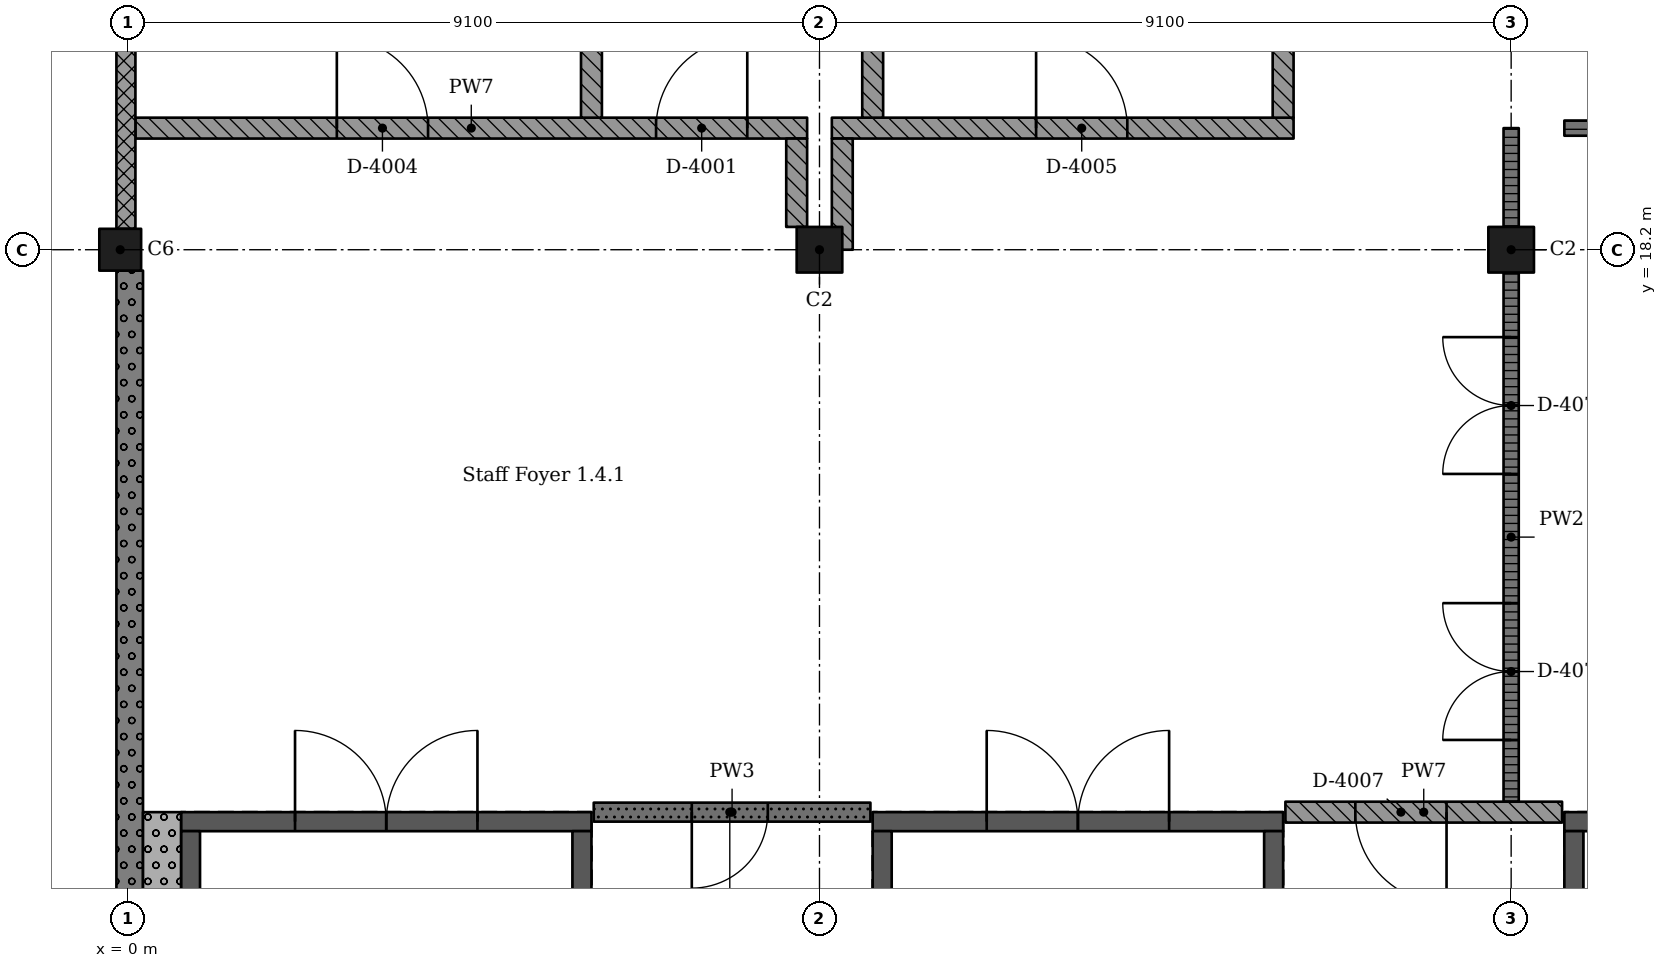
"""IFC4 building model, lengths in metres.
Left out: names, types, materials, properties, quantities, classifications, styles, units other than length and angle.
Written with IfcOpenShell. Run it as: python <this file> out.ifc"""

import sys

from ifc_helpers import new_model, si_unit, direction, frame, frame_2d, origin, origin_2d, place, context, subcontext, project, spatial, rectangle, extrude, element, fill, save


model = new_model("IFC4")
c1 = context("Model", 3, precision=1e-05, world=origin(), true_north=direction((0.0, 1.0)))
c2 = subcontext(c1, "Body", "Model", "MODEL_VIEW")
j1 = project(units=[si_unit("LENGTHUNIT", "METRE"), si_unit("PLANEANGLEUNIT", "RADIAN")], contexts=[c1])
p1 = place(None, origin())
s1 = spatial("IfcSite", under=j1, at=p1, CompositionType="ELEMENT")
p2 = place(p1, origin())
s2 = spatial("IfcBuilding", under=s1, at=p2, CompositionType="ELEMENT")
p3 = place(p2, frame((0.0, 0.0, 20.02)))
s3 = spatial("IfcBuildingStorey", under=s2, at=p3, CompositionType="ELEMENT", Elevation=20.02)
p4 = place(p3, frame((-0.1, 18.2, 0.0), z_axis=(0.0, 0.0, 1.0), x_axis=(1.0, 0.0, 0.0)))
e1 = element("IfcColumn", 1, at=p4, inside=s3, PredefinedType="COLUMN", context=c2, shape_type="SweptSolid", body=[
    extrude(rectangle(XDim=0.55, YDim=0.55, at=origin_2d()), origin(), (0.0, 0.0, 1.0), 4.55),
])
for number, where, z_axis, x_axis in (
    (2, (9.1, 18.2, 0.0), (0.0, 0.0, 1.0), (1.0, 0.0, 0.0)),
    (3, (18.2, 18.2, 0.0), (0.0, 0.0, 1.0), (1.0, 0.0, 0.0)),
):
    element("IfcColumn", number, at=place(p3, frame(where, z_axis=z_axis, x_axis=x_axis)), inside=s3, PredefinedType="COLUMN", context=c2, shape_type="SweptSolid", body=[
        extrude(rectangle(XDim=0.6, YDim=0.6, at=origin_2d()), origin(), (0.0, 0.0, 1.0), 4.55),
    ])
p5 = place(p3, frame((6.1, 10.675, 0.0), z_axis=(0.0, 0.0, 1.0), x_axis=(-1.0, 0.0, 0.0)))
e4 = element("IfcWall", 4, at=p5, inside=s3, PredefinedType="SHEAR", context=c2, shape_type="SweptSolid", body=[
    extrude(rectangle(XDim=5.4, YDim=0.25, at=frame_2d((2.7, 0.0))), origin(), (0.0, 0.0, 1.0), 4.55),
])
p6 = place(p5, frame((1.5, 0.0, 0.0)))
e5 = element("IfcOpeningElement", 5, at=p6, cuts=e4, PredefinedType="OPENING", context=c2, shape_type="SweptSolid", body=[
    extrude(rectangle(XDim=2.4, YDim=2.1, at=frame_2d((1.2, 1.05))), frame((0.0, 0.135, 0.0), z_axis=(0.0, -1.0, 0.0), x_axis=(1.0, 0.0, 0.0)), (0.0, 0.0, 1.0), 0.27),
])
for number, where, z_axis, x_axis in (
    (6, (0.825, 10.55, 0.0), (0.0, 0.0, 1.0), (0.0, -1.0, 0.0)),
    (7, (5.975, 10.55, 0.0), (0.0, 0.0, 1.0), (0.0, -1.0, 0.0)),
):
    element("IfcWall", number, at=place(p3, frame(where, z_axis=z_axis, x_axis=x_axis)), inside=s3, PredefinedType="SHEAR", context=c2, shape_type="SweptSolid", body=[
        extrude(rectangle(XDim=9.6, YDim=0.25, at=frame_2d((4.8, 0.0))), origin(), (0.0, 0.0, 1.0), 4.55),
    ])
p7 = place(p3, frame((15.2, 10.675, 0.0), z_axis=(0.0, 0.0, 1.0), x_axis=(-1.0, 0.0, 0.0)))
e8 = element("IfcWall", 8, at=p7, inside=s3, PredefinedType="SHEAR", context=c2, shape_type="SweptSolid", body=[
    extrude(rectangle(XDim=5.4, YDim=0.25, at=frame_2d((2.7, 0.0))), origin(), (0.0, 0.0, 1.0), 4.55),
])
p8 = place(p7, frame((1.5, 0.0, 0.0)))
e9 = element("IfcOpeningElement", 9, at=p8, cuts=e8, PredefinedType="OPENING", context=c2, shape_type="SweptSolid", body=[
    extrude(rectangle(XDim=2.4, YDim=2.1, at=frame_2d((1.2, 1.05))), frame((0.0, 0.135, 0.0), z_axis=(0.0, -1.0, 0.0), x_axis=(1.0, 0.0, 0.0)), (0.0, 0.0, 1.0), 0.27),
])
for number, where, z_axis, x_axis in (
    (10, (9.925, 10.55, 0.0), (0.0, 0.0, 1.0), (0.0, -1.0, 0.0)),
    (11, (15.075, 10.55, 0.0), (0.0, 0.0, 1.0), (0.0, -1.0, 0.0)),
):
    element("IfcWall", number, at=place(p3, frame(where, z_axis=z_axis, x_axis=x_axis)), inside=s3, PredefinedType="SHEAR", context=c2, shape_type="SweptSolid", body=[
        extrude(rectangle(XDim=9.6, YDim=0.25, at=frame_2d((4.8, 0.0))), origin(), (0.0, 0.0, 1.0), 4.55),
    ])
p9 = place(p3, frame((24.3, 10.675, 0.0), z_axis=(0.0, 0.0, 1.0), x_axis=(-1.0, 0.0, 0.0)))
e12 = element("IfcWall", 12, at=p9, inside=s3, PredefinedType="SHEAR", context=c2, shape_type="SweptSolid", body=[
    extrude(rectangle(XDim=5.4, YDim=0.25, at=frame_2d((2.7, 0.0))), origin(), (0.0, 0.0, 1.0), 4.55),
])
p10 = place(p9, frame((1.5, 0.0, 0.0)))
e13 = element("IfcOpeningElement", 13, at=p10, cuts=e12, PredefinedType="OPENING", context=c2, shape_type="SweptSolid", body=[
    extrude(rectangle(XDim=2.4, YDim=2.1, at=frame_2d((1.2, 1.05))), frame((0.0, 0.135, 0.0), z_axis=(0.0, -1.0, 0.0), x_axis=(1.0, 0.0, 0.0)), (0.0, 0.0, 1.0), 0.27),
])
p11 = place(p3, frame((19.025, 10.55, 0.0), z_axis=(0.0, 0.0, 1.0), x_axis=(0.0, -1.0, 0.0)))
e14 = element("IfcWall", 14, at=p11, inside=s3, PredefinedType="SHEAR", context=c2, shape_type="SweptSolid", body=[
    extrude(rectangle(XDim=9.6, YDim=0.25, at=frame_2d((4.8, 0.0))), origin(), (0.0, 0.0, 1.0), 4.55),
])
p12 = place(p3, frame((-0.025, 27.025, 0.0), z_axis=(0.0, 0.0, 1.0), x_axis=(0.0, -1.0, 0.0)))
e15 = element("IfcWall", 15, at=p12, inside=s3, PredefinedType="SOLIDWALL", context=c2, shape_type="SweptSolid", body=[
    extrude(rectangle(XDim=8.55, YDim=0.25, at=frame_2d((4.275, 0.0))), origin(), (0.0, 0.0, 1.0), 3.5),
])
p13 = place(p3, frame((0.025, 17.925, 0.0), z_axis=(0.0, 0.0, 1.0), x_axis=(0.0, -1.0, 0.0)))
e16 = element("IfcWall", 16, at=p13, inside=s3, PredefinedType="SOLIDWALL", context=c2, shape_type="SweptSolid", body=[
    extrude(rectangle(XDim=8.575, YDim=0.35, at=frame_2d((4.288, 0.0))), origin(), (0.0, 0.0, 1.0), 3.5),
])
p14 = place(p3, frame((0.45, 0.7, 0.0), z_axis=(0.0, 0.0, 1.0), x_axis=(0.0, 1.0, 0.0)))
e17 = element("IfcWall", 17, at=p14, inside=s3, PredefinedType="SOLIDWALL", context=c2, shape_type="SweptSolid", body=[
    extrude(rectangle(XDim=10.1, YDim=0.5, at=frame_2d((5.05, 0.0))), origin(), (0.0, 0.0, 1.0), 4.25),
])
p15 = place(p3, frame((0.1, 19.8, 0.0), z_axis=(0.0, 0.0, 1.0), x_axis=(1.0, 0.0, 0.0)))
e18 = element("IfcWall", 18, at=p15, inside=s3, PredefinedType="SOLIDWALL", context=c2, shape_type="SweptSolid", body=[
    extrude(rectangle(XDim=8.837, YDim=0.275, at=frame_2d((4.419, 0.0))), origin(), (0.0, 0.0, 1.0), 4.25),
])
p16 = place(p15, frame((6.85, 0.0, 0.0)))
e19 = element("IfcOpeningElement", 19, at=p16, cuts=e18, PredefinedType="OPENING", context=c2, shape_type="SweptSolid", body=[
    extrude(rectangle(XDim=1.2, YDim=2.4, at=frame_2d((0.6, 1.2))), frame((0.0, 0.147, 0.0), z_axis=(0.0, -1.0, 0.0), x_axis=(1.0, 0.0, 0.0)), (0.0, 0.0, 1.0), 0.295),
])
p17 = place(p15, frame((2.65, 0.0, 0.0)))
e20 = element("IfcOpeningElement", 20, at=p17, cuts=e18, PredefinedType="OPENING", context=c2, shape_type="SweptSolid", body=[
    extrude(rectangle(XDim=1.2, YDim=2.4, at=frame_2d((0.6, 1.2))), frame((0.0, 0.147, 0.0), z_axis=(0.0, -1.0, 0.0), x_axis=(1.0, 0.0, 0.0)), (0.0, 0.0, 1.0), 0.295),
])
p18 = place(p3, frame((6.1, 29.762, 0.0), z_axis=(0.0, 0.0, 1.0), x_axis=(0.0, -1.0, 0.0)))
e21 = element("IfcWall", 21, at=p18, inside=s3, PredefinedType="SOLIDWALL", context=c2, shape_type="SweptSolid", body=[
    extrude(rectangle(XDim=9.825, YDim=0.275, at=frame_2d((4.913, 0.0))), origin(), (0.0, 0.0, 1.0), 4.25),
])
p19 = place(p3, frame((8.8, 19.663, 0.0), z_axis=(0.0, 0.0, 1.0), x_axis=(0.0, -1.0, 0.0)))
e22 = element("IfcWall", 22, at=p19, inside=s3, PredefinedType="SOLIDWALL", context=c2, shape_type="SweptSolid", body=[
    extrude(rectangle(XDim=1.163, YDim=0.275, at=frame_2d((0.581, 0.0))), origin(), (0.0, 0.0, 1.0), 4.25),
])
p20 = place(p3, frame((9.262, 19.8, 0.0), z_axis=(0.0, 0.0, 1.0), x_axis=(1.0, 0.0, 0.0)))
e23 = element("IfcWall", 23, at=p20, inside=s3, PredefinedType="SOLIDWALL", context=c2, shape_type="SweptSolid", body=[
    extrude(rectangle(XDim=6.075, YDim=0.275, at=frame_2d((3.038, 0.0))), origin(), (0.0, 0.0, 1.0), 4.25),
])
p21 = place(p20, frame((2.688, 0.0, 0.0)))
e24 = element("IfcOpeningElement", 24, at=p21, cuts=e23, PredefinedType="OPENING", context=c2, shape_type="SweptSolid", body=[
    extrude(rectangle(XDim=1.2, YDim=2.4, at=frame_2d((0.6, 1.2))), frame((0.0, 0.147, 0.0), z_axis=(0.0, -1.0, 0.0), x_axis=(1.0, 0.0, 0.0)), (0.0, 0.0, 1.0), 0.295),
])
p22 = place(p3, frame((9.4, 18.2, 0.0), z_axis=(0.0, 0.0, 1.0), x_axis=(0.0, 1.0, 0.0)))
e25 = element("IfcWall", 25, at=p22, inside=s3, PredefinedType="SOLIDWALL", context=c2, shape_type="SweptSolid", body=[
    extrude(rectangle(XDim=1.463, YDim=0.275, at=frame_2d((0.731, 0.0))), origin(), (0.0, 0.0, 1.0), 4.25),
])
p23 = place(p3, frame((9.77, 10.8, 0.0), z_axis=(0.0, 0.0, 1.0), x_axis=(-1.0, 0.0, 0.0)))
e26 = element("IfcWall", 26, at=p23, inside=s3, PredefinedType="SOLIDWALL", context=c2, shape_type="SweptSolid", body=[
    extrude(rectangle(XDim=3.64, YDim=0.25, at=frame_2d((1.82, 0.0))), origin(), (0.0, 0.0, 1.0), 4.25),
])
p24 = place(p23, frame((1.35, 0.0, 0.0)))
e27 = element("IfcOpeningElement", 27, at=p24, cuts=e26, PredefinedType="OPENING", context=c2, shape_type="SweptSolid", body=[
    extrude(rectangle(XDim=1.0, YDim=2.1, at=frame_2d((0.5, 1.05))), frame((0.0, 0.135, 0.0), z_axis=(0.0, -1.0, 0.0), x_axis=(1.0, 0.0, 0.0)), (0.0, 0.0, 1.0), 0.27),
])
p25 = place(p3, frame((9.8, 19.938, 0.0), z_axis=(0.0, 0.0, 1.0), x_axis=(0.0, 1.0, 0.0)))
e28 = element("IfcWall", 28, at=p25, inside=s3, PredefinedType="SOLIDWALL", context=c2, shape_type="SweptSolid", body=[
    extrude(rectangle(XDim=6.925, YDim=0.275, at=frame_2d((3.462, 0.0))), origin(), (0.0, 0.0, 1.0), 4.25),
])
p26 = place(p3, frame((15.2, 29.762, 0.0), z_axis=(0.0, 0.0, 1.0), x_axis=(0.0, -1.0, 0.0)))
e29 = element("IfcWall", 29, at=p26, inside=s3, PredefinedType="SOLIDWALL", context=c2, shape_type="SweptSolid", body=[
    extrude(rectangle(XDim=9.825, YDim=0.275, at=frame_2d((4.913, 0.0))), origin(), (0.0, 0.0, 1.0), 4.25),
])
p27 = place(p3, frame((15.23, 10.8, 0.0), z_axis=(0.0, 0.0, 1.0), x_axis=(1.0, 0.0, 0.0)))
e30 = element("IfcWall", 30, at=p27, inside=s3, PredefinedType="SOLIDWALL", context=c2, shape_type="SweptSolid", body=[
    extrude(rectangle(XDim=3.64, YDim=0.275, at=frame_2d((1.82, 0.0))), origin(), (0.0, 0.0, 1.0), 4.25),
])
p28 = place(p27, frame((0.92, 0.0, 0.0)))
e31 = element("IfcOpeningElement", 31, at=p28, cuts=e30, PredefinedType="OPENING", context=c2, shape_type="SweptSolid", body=[
    extrude(rectangle(XDim=1.2, YDim=2.4, at=frame_2d((0.6, 1.2))), frame((0.0, 0.147, 0.0), z_axis=(0.0, -1.0, 0.0), x_axis=(1.0, 0.0, 0.0)), (0.0, 0.0, 1.0), 0.295),
])
p29 = place(p3, frame((18.2, 17.9, 0.0), z_axis=(0.0, 0.0, 1.0), x_axis=(0.0, -1.0, 0.0)))
e32 = element("IfcWall", 32, at=p29, inside=s3, PredefinedType="PARTITIONING", context=c2, shape_type="SweptSolid", body=[
    extrude(rectangle(XDim=6.962, YDim=0.2, at=frame_2d((3.481, 0.0))), origin(), (0.0, 0.0, 1.0), 3.5),
])
p30 = place(p29, frame((0.85, 0.0, 0.0)))
e33 = element("IfcOpeningElement", 33, at=p30, cuts=e32, PredefinedType="OPENING", context=c2, shape_type="SweptSolid", body=[
    extrude(rectangle(XDim=1.8, YDim=2.4, at=frame_2d((0.9, 1.2))), frame((0.0, 0.11, 0.0), z_axis=(0.0, -1.0, 0.0), x_axis=(1.0, 0.0, 0.0)), (0.0, 0.0, 1.0), 0.22),
])
p31 = place(p29, frame((4.35, 0.0, 0.0)))
e34 = element("IfcOpeningElement", 34, at=p31, cuts=e32, PredefinedType="OPENING", context=c2, shape_type="SweptSolid", body=[
    extrude(rectangle(XDim=1.8, YDim=2.4, at=frame_2d((0.9, 1.2))), frame((0.0, 0.11, 0.0), z_axis=(0.0, -1.0, 0.0), x_axis=(1.0, 0.0, 0.0)), (0.0, 0.0, 1.0), 0.22),
])
p32 = place(p3, frame((18.2, 19.8, 0.0), z_axis=(0.0, 0.0, 1.0), x_axis=(0.0, -1.0, 0.0)))
e35 = element("IfcWall", 35, at=p32, inside=s3, PredefinedType="PARTITIONING", context=c2, shape_type="SweptSolid", body=[
    extrude(rectangle(XDim=1.3, YDim=0.2, at=frame_2d((0.65, 0.0))), origin(), (0.0, 0.0, 1.0), 3.5),
])
p33 = place(p3, frame((18.9, 19.8, 0.0), z_axis=(0.0, 0.0, 1.0), x_axis=(1.0, 0.0, 0.0)))
e36 = element("IfcWall", 36, at=p33, inside=s3, PredefinedType="PARTITIONING", context=c2, shape_type="SweptSolid", body=[
    extrude(rectangle(XDim=5.4, YDim=0.2, at=frame_2d((2.7, 0.0))), origin(), (0.0, 0.0, 1.0), 4.25),
])
p34 = place(p33, frame((1.85, 0.0, 0.0)))
e37 = element("IfcOpeningElement", 37, at=p34, cuts=e36, PredefinedType="OPENING", context=c2, shape_type="SweptSolid", body=[
    extrude(rectangle(XDim=1.8, YDim=2.4, at=frame_2d((0.9, 1.2))), frame((0.0, 0.11, 0.0), z_axis=(0.0, -1.0, 0.0), x_axis=(1.0, 0.0, 0.0)), (0.0, 0.0, 1.0), 0.22),
])
p35 = place(p16, origin())
e38 = element("IfcDoor", 38, at=p35, inside=s3, OperationType="SINGLE_SWING_LEFT", PredefinedType="DOOR", context=c2, shape_type="SweptSolid", body=[
    extrude(rectangle(XDim=1.2, YDim=2.4, at=frame_2d((0.6, 1.2))), frame((0.0, 0.025, 0.0), z_axis=(0.0, -1.0, 0.0), x_axis=(1.0, 0.0, 0.0)), (0.0, 0.0, 1.0), 0.05),
])
fill(e19, e38)
p36 = place(p17, origin())
e39 = element("IfcDoor", 39, at=p36, inside=s3, OperationType="SINGLE_SWING_RIGHT", PredefinedType="DOOR", context=c2, shape_type="SweptSolid", body=[
    extrude(rectangle(XDim=1.2, YDim=2.4, at=frame_2d((0.6, 1.2))), frame((0.0, 0.025, 0.0), z_axis=(0.0, -1.0, 0.0), x_axis=(1.0, 0.0, 0.0)), (0.0, 0.0, 1.0), 0.05),
])
fill(e20, e39)
p37 = place(p21, origin())
e40 = element("IfcDoor", 40, at=p37, inside=s3, OperationType="SINGLE_SWING_RIGHT", PredefinedType="DOOR", context=c2, shape_type="SweptSolid", body=[
    extrude(rectangle(XDim=1.2, YDim=2.4, at=frame_2d((0.6, 1.2))), frame((0.0, 0.025, 0.0), z_axis=(0.0, -1.0, 0.0), x_axis=(1.0, 0.0, 0.0)), (0.0, 0.0, 1.0), 0.05),
])
fill(e24, e40)
p38 = place(p24, origin())
e41 = element("IfcDoor", 41, at=p38, inside=s3, OperationType="SINGLE_SWING_LEFT", PredefinedType="DOOR", context=c2, shape_type="SweptSolid", body=[
    extrude(rectangle(XDim=1.0, YDim=2.1, at=frame_2d((0.5, 1.05))), frame((0.0, 0.025, 0.0), z_axis=(0.0, -1.0, 0.0), x_axis=(1.0, 0.0, 0.0)), (0.0, 0.0, 1.0), 0.05),
])
fill(e27, e41)
p39 = place(p28, origin())
e42 = element("IfcDoor", 42, at=p39, inside=s3, OperationType="SINGLE_SWING_RIGHT", PredefinedType="DOOR", context=c2, shape_type="SweptSolid", body=[
    extrude(rectangle(XDim=1.2, YDim=2.4, at=frame_2d((0.6, 1.2))), frame((0.0, 0.025, 0.0), z_axis=(0.0, -1.0, 0.0), x_axis=(1.0, 0.0, 0.0)), (0.0, 0.0, 1.0), 0.05),
])
fill(e31, e42)
p40 = place(p30, origin())
e43 = element("IfcDoor", 43, at=p40, inside=s3, OperationType="DOUBLE_DOOR_SINGLE_SWING", PredefinedType="DOOR", context=c2, shape_type="SweptSolid", body=[
    extrude(rectangle(XDim=1.8, YDim=2.4, at=frame_2d((0.9, 1.2))), frame((0.0, 0.025, 0.0), z_axis=(0.0, -1.0, 0.0), x_axis=(1.0, 0.0, 0.0)), (0.0, 0.0, 1.0), 0.05),
])
fill(e33, e43)
p41 = place(p31, origin())
e44 = element("IfcDoor", 44, at=p41, inside=s3, OperationType="DOUBLE_DOOR_SINGLE_SWING", PredefinedType="DOOR", context=c2, shape_type="SweptSolid", body=[
    extrude(rectangle(XDim=1.8, YDim=2.4, at=frame_2d((0.9, 1.2))), frame((0.0, 0.025, 0.0), z_axis=(0.0, -1.0, 0.0), x_axis=(1.0, 0.0, 0.0)), (0.0, 0.0, 1.0), 0.05),
])
fill(e34, e44)
p42 = place(p6, origin())
e45 = element("IfcDoor", 45, at=p42, inside=s3, OperationType="DOUBLE_DOOR_SINGLE_SWING", PredefinedType="DOOR", context=c2, shape_type="SweptSolid", body=[
    extrude(rectangle(XDim=2.4, YDim=2.1, at=frame_2d((1.2, 1.05))), frame((0.0, 0.025, 0.0), z_axis=(0.0, -1.0, 0.0), x_axis=(1.0, 0.0, 0.0)), (0.0, 0.0, 1.0), 0.05),
])
fill(e5, e45)
p43 = place(p8, origin())
e46 = element("IfcDoor", 46, at=p43, inside=s3, OperationType="DOUBLE_DOOR_SINGLE_SWING", PredefinedType="DOOR", context=c2, shape_type="SweptSolid", body=[
    extrude(rectangle(XDim=2.4, YDim=2.1, at=frame_2d((1.2, 1.05))), frame((0.0, 0.025, 0.0), z_axis=(0.0, -1.0, 0.0), x_axis=(1.0, 0.0, 0.0)), (0.0, 0.0, 1.0), 0.05),
])
fill(e9, e46)
save(model, sys.argv[1])
